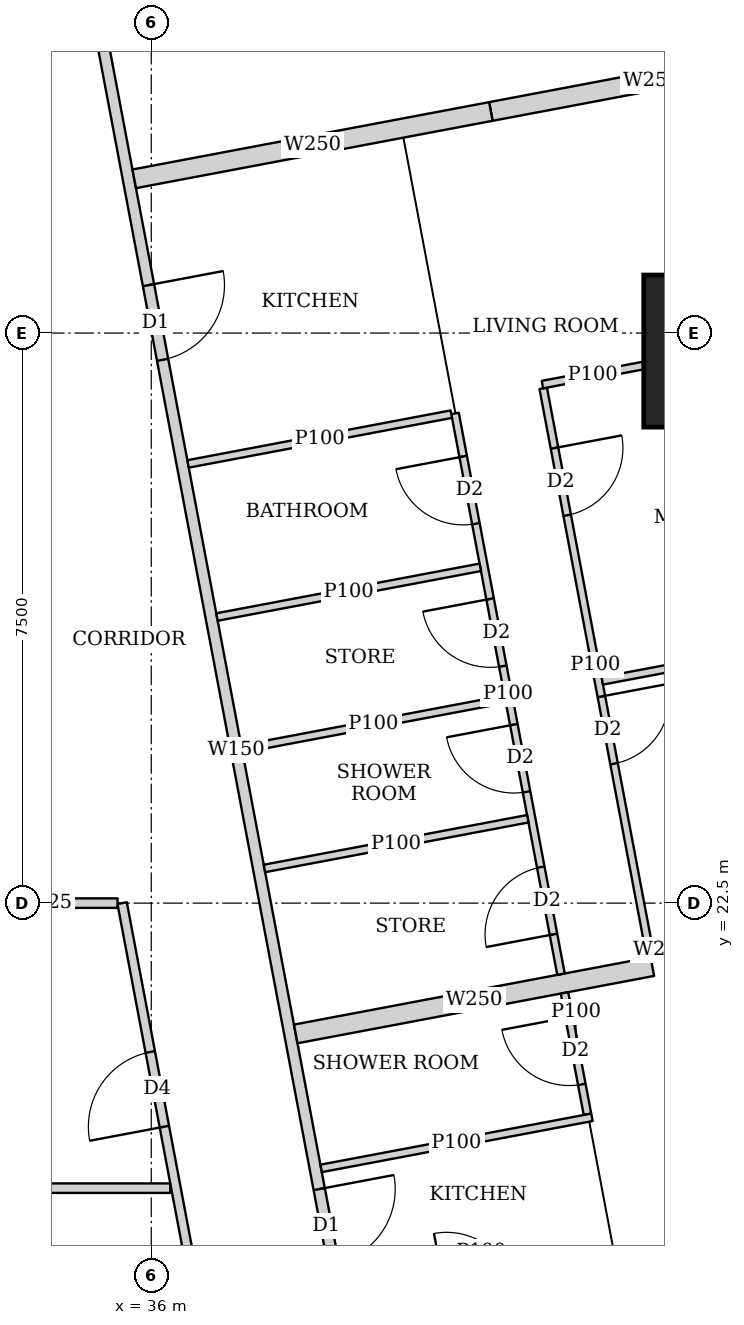
"""IFC4 building model, lengths in metres.
Left out: names, types, materials, properties, quantities, classifications, styles, units other than length and angle.
Written with IfcOpenShell. Run it as: python <this file> out.ifc"""

import sys

from ifc_helpers import new_model, si_unit, direction, frame, frame_2d, origin, origin_2d, place, context, subcontext, project, spatial, rectangle, extrude, element, fill, save


model = new_model("IFC4")
c1 = context("Model", 3, precision=1e-05, world=origin(), true_north=direction((0.0, 1.0)))
c2 = subcontext(c1, "Body", "Model", "MODEL_VIEW")
j1 = project(units=[si_unit("LENGTHUNIT", "METRE"), si_unit("PLANEANGLEUNIT", "RADIAN")], contexts=[c1])
p1 = place(None, origin())
s1 = spatial("IfcSite", under=j1, at=p1, CompositionType="ELEMENT")
p2 = place(p1, origin())
s2 = spatial("IfcBuilding", under=s1, at=p2, CompositionType="ELEMENT")
p3 = place(p2, frame((0.0, 0.0, 259.1)))
s3 = spatial("IfcBuildingStorey", under=s2, at=p3, CompositionType="ELEMENT", Elevation=259.1)
p4 = place(p3, frame((43.48, 29.763, 0.0), z_axis=(0.0, 0.0, 1.0), x_axis=(1.0, 0.0, 0.0)))
e1 = element("IfcColumn", 1, at=p4, inside=s3, PredefinedType="COLUMN", context=c2, shape_type="SweptSolid", body=[
    extrude(rectangle(XDim=2.0, YDim=2.0, at=origin_2d()), origin(), (0.0, 0.0, 1.0), 3.75),
])
p5 = place(p3, frame((33.781, 42.186, 0.0), z_axis=(0.0, 0.0, 1.0), x_axis=(0.185593518645, -0.9826266055, 0.0)))
e2 = element("IfcWall", 2, at=p5, inside=s3, PredefinedType="SOLIDWALL", context=c2, shape_type="SweptSolid", body=[
    extrude(rectangle(XDim=35.961, YDim=0.15, at=frame_2d((17.98, 0.0))), origin(), (0.0, 0.0, 1.0), 2.5),
])
p6 = place(p5, frame((7.183, 0.0, 0.0)))
e3 = element("IfcOpeningElement", 3, at=p6, cuts=e2, PredefinedType="OPENING", context=c2, shape_type="SweptSolid", body=[
    extrude(rectangle(XDim=1.0, YDim=2.1, at=frame_2d((0.5, 1.05))), frame((0.0, 0.085, 0.0), z_axis=(0.0, -1.0, 0.0), x_axis=(1.0, 0.0, 0.0)), (0.0, 0.0, 1.0), 0.17),
])
p7 = place(p5, frame((11.76, 0.0, 0.0)))
e4 = element("IfcOpeningElement", 4, at=p7, cuts=e2, PredefinedType="OPENING", context=c2, shape_type="SweptSolid", body=[
    extrude(rectangle(XDim=1.0, YDim=2.1, at=frame_2d((0.5, 1.05))), frame((0.0, 0.085, 0.0), z_axis=(0.0, -1.0, 0.0), x_axis=(1.0, 0.0, 0.0)), (0.0, 0.0, 1.0), 0.17),
])
p8 = place(p5, frame((23.863, 0.0, 0.0)))
e5 = element("IfcOpeningElement", 5, at=p8, cuts=e2, PredefinedType="OPENING", context=c2, shape_type="SweptSolid", body=[
    extrude(rectangle(XDim=1.0, YDim=2.1, at=frame_2d((0.5, 1.05))), frame((0.0, 0.085, 0.0), z_axis=(0.0, -1.0, 0.0), x_axis=(1.0, 0.0, 0.0)), (0.0, 0.0, 1.0), 0.17),
])
p9 = place(p5, frame((30.502, 0.0, 0.0)))
e6 = element("IfcOpeningElement", 6, at=p9, cuts=e2, PredefinedType="OPENING", context=c2, shape_type="SweptSolid", body=[
    extrude(rectangle(XDim=1.0, YDim=2.1, at=frame_2d((0.5, 1.05))), frame((0.0, 0.085, 0.0), z_axis=(0.0, -1.0, 0.0), x_axis=(1.0, 0.0, 0.0)), (0.0, 0.0, 1.0), 0.17),
])
p10 = place(p3, frame((41.157, 29.273, 0.0), z_axis=(0.0, 0.0, 1.0), x_axis=(0.18542464283, -0.982658486877, 0.0)))
e7 = element("IfcWall", 7, at=p10, inside=s3, PredefinedType="PARTITIONING", context=c2, shape_type="SweptSolid", body=[
    extrude(rectangle(XDim=7.421, YDim=0.1, at=frame_2d((3.71, 0.0))), origin(), (0.0, 0.0, 1.0), 2.5),
])
p11 = place(p10, frame((0.8, 0.0, 0.0)))
e8 = element("IfcOpeningElement", 8, at=p11, cuts=e7, PredefinedType="OPENING", context=c2, shape_type="SweptSolid", body=[
    extrude(rectangle(XDim=0.9, YDim=2.1, at=frame_2d((0.45, 1.05))), frame((0.0, 0.06, 0.0), z_axis=(0.0, -1.0, 0.0), x_axis=(1.0, 0.0, 0.0)), (0.0, 0.0, 1.0), 0.12),
])
p12 = place(p10, frame((4.126, 0.0, 0.0)))
e9 = element("IfcOpeningElement", 9, at=p12, cuts=e7, PredefinedType="OPENING", context=c2, shape_type="SweptSolid", body=[
    extrude(rectangle(XDim=0.9, YDim=2.1, at=frame_2d((0.45, 1.05))), frame((0.0, 0.06, 0.0), z_axis=(0.0, -1.0, 0.0), x_axis=(1.0, 0.0, 0.0)), (0.0, 0.0, 1.0), 0.12),
])
p13 = place(p3, frame((39.997, 28.942, 0.0), z_axis=(0.0, 0.0, 1.0), x_axis=(0.185686318797, -0.982609073341, 0.0)))
e10 = element("IfcWall", 10, at=p13, inside=s3, PredefinedType="PARTITIONING", context=c2, shape_type="SweptSolid", body=[
    extrude(rectangle(XDim=7.508, YDim=0.1, at=frame_2d((3.754, 0.0))), origin(), (0.0, 0.0, 1.0), 2.5),
])
p14 = place(p13, frame((0.576, 0.0, 0.0)))
e11 = element("IfcOpeningElement", 11, at=p14, cuts=e10, PredefinedType="OPENING", context=c2, shape_type="SweptSolid", body=[
    extrude(rectangle(XDim=0.9, YDim=2.1, at=frame_2d((0.45, 1.05))), frame((0.0, 0.06, 0.0), z_axis=(0.0, -1.0, 0.0), x_axis=(1.0, 0.0, 0.0)), (0.0, 0.0, 1.0), 0.12),
])
p15 = place(p13, frame((4.166, 0.0, 0.0)))
e12 = element("IfcOpeningElement", 12, at=p15, cuts=e10, PredefinedType="OPENING", context=c2, shape_type="SweptSolid", body=[
    extrude(rectangle(XDim=0.9, YDim=2.1, at=frame_2d((0.45, 1.05))), frame((0.0, 0.06, 0.0), z_axis=(0.0, -1.0, 0.0), x_axis=(1.0, 0.0, 0.0)), (0.0, 0.0, 1.0), 0.12),
])
p16 = place(p13, frame((2.483, 0.0, 0.0)))
e13 = element("IfcOpeningElement", 13, at=p16, cuts=e10, PredefinedType="OPENING", context=c2, shape_type="SweptSolid", body=[
    extrude(rectangle(XDim=0.9, YDim=2.1, at=frame_2d((0.45, 1.05))), frame((0.0, 0.06, 0.0), z_axis=(0.0, -1.0, 0.0), x_axis=(1.0, 0.0, 0.0)), (0.0, 0.0, 1.0), 0.12),
])
p17 = place(p13, frame((6.074, 0.0, 0.0)))
e14 = element("IfcOpeningElement", 14, at=p17, cuts=e10, PredefinedType="OPENING", context=c2, shape_type="SweptSolid", body=[
    extrude(rectangle(XDim=0.9, YDim=2.1, at=frame_2d((0.45, 1.05))), frame((0.0, 0.06, 0.0), z_axis=(0.0, -1.0, 0.0), x_axis=(1.0, 0.0, 0.0)), (0.0, 0.0, 1.0), 0.12),
])
p18 = place(p3, frame((42.47, 29.572, 0.0), z_axis=(0.0, 0.0, 1.0), x_axis=(-0.982610503289, -0.185678751683, 0.0)))
e15 = element("IfcWall", 15, at=p18, inside=s3, PredefinedType="PARTITIONING", context=c2, shape_type="SweptSolid", body=[
    extrude(rectangle(XDim=1.346, YDim=0.1, at=frame_2d((0.673, 0.0))), origin(), (0.0, 0.0, 1.0), 2.5),
])
p19 = place(p3, frame((46.11, 26.213, 0.0), z_axis=(0.0, 0.0, 1.0), x_axis=(-0.982623519589, -0.185609856287, 0.0)))
e16 = element("IfcWall", 16, at=p19, inside=s3, PredefinedType="PARTITIONING", context=c2, shape_type="SweptSolid", body=[
    extrude(rectangle(XDim=4.25, YDim=0.1, at=frame_2d((2.125, 0.0))), origin(), (0.0, 0.0, 1.0), 2.5),
])
p20 = place(p3, frame((39.948, 28.933, 0.0), z_axis=(0.0, 0.0, 1.0), x_axis=(-0.982588017646, -0.185797706064, 0.0)))
e17 = element("IfcWall", 17, at=p20, inside=s3, PredefinedType="PARTITIONING", context=c2, shape_type="SweptSolid", body=[
    extrude(rectangle(XDim=3.525, YDim=0.1, at=frame_2d((1.763, 0.0))), origin(), (0.0, 0.0, 1.0), 3.5),
])
p21 = place(p3, frame((40.656, 25.183, 0.0), z_axis=(0.0, 0.0, 1.0), x_axis=(-0.982576058723, -0.185860939478, 0.0)))
e18 = element("IfcWall", 18, at=p21, inside=s3, PredefinedType="PARTITIONING", context=c2, shape_type="SweptSolid", body=[
    extrude(rectangle(XDim=3.524, YDim=0.1, at=frame_2d((1.762, 0.0))), origin(), (0.0, 0.0, 1.0), 3.5),
])
p22 = place(p3, frame((40.329, 26.918, 0.0), z_axis=(0.0, 0.0, 1.0), x_axis=(-0.982638553676, -0.185530247748, 0.0)))
e19 = element("IfcWall", 19, at=p22, inside=s3, PredefinedType="PARTITIONING", context=c2, shape_type="SweptSolid", body=[
    extrude(rectangle(XDim=3.525, YDim=0.1, at=frame_2d((1.763, 0.0))), origin(), (0.0, 0.0, 1.0), 3.5),
])
p23 = place(p3, frame((40.954, 23.61, 0.0), z_axis=(0.0, 0.0, 1.0), x_axis=(-0.98264808502, -0.18547975902, 0.0)))
e20 = element("IfcWall", 20, at=p23, inside=s3, PredefinedType="PARTITIONING", context=c2, shape_type="SweptSolid", body=[
    extrude(rectangle(XDim=3.526, YDim=0.1, at=frame_2d((1.763, 0.0))), origin(), (0.0, 0.0, 1.0), 2.5),
])
p24 = place(p3, frame((44.693, 33.713, 0.0), z_axis=(0.0, 0.0, 1.0), x_axis=(-0.982633535512, -0.185556823879, 0.0)))
e21 = element("IfcWall", 21, at=p24, inside=s3, PredefinedType="SOLIDWALL", context=c2, shape_type="SweptSolid", body=[
    extrude(rectangle(XDim=4.3, YDim=0.25, at=frame_2d((2.15, 0.0))), origin(), (0.0, 0.0, 1.0), 2.5),
])
p25 = place(p3, frame((40.468, 32.915, 0.0), z_axis=(0.0, 0.0, 1.0), x_axis=(-0.982635807605, -0.185544791394, 0.0)))
e22 = element("IfcWall", 22, at=p25, inside=s3, PredefinedType="SOLIDWALL", context=c2, shape_type="SweptSolid", body=[
    extrude(rectangle(XDim=4.775, YDim=0.25, at=frame_2d((2.388, 0.0))), origin(), (0.0, 0.0, 1.0), 3.5),
])
p26 = place(p3, frame((41.437, 21.319, 0.0), z_axis=(0.0, 0.0, 1.0), x_axis=(0.185793689589, -0.982588777113, 0.0)))
e23 = element("IfcWall", 23, at=p26, inside=s3, PredefinedType="PARTITIONING", context=c2, shape_type="SweptSolid", body=[
    extrude(rectangle(XDim=1.625, YDim=0.1, at=frame_2d((0.813, 0.0))), origin(), (0.0, 0.0, 1.0), 3.5),
])
p27 = place(p26, frame((0.325, 0.0, 0.0)))
e24 = element("IfcOpeningElement", 24, at=p27, cuts=e23, PredefinedType="OPENING", context=c2, shape_type="SweptSolid", body=[
    extrude(rectangle(XDim=0.9, YDim=2.1, at=frame_2d((0.45, 1.05))), frame((0.0, 0.06, 0.0), z_axis=(0.0, -1.0, 0.0), x_axis=(1.0, 0.0, 0.0)), (0.0, 0.0, 1.0), 0.12),
])
p28 = place(p3, frame((41.798, 19.682, 0.0), z_axis=(0.0, 0.0, 1.0), x_axis=(-0.982681091817, -0.185304807776, 0.0)))
e25 = element("IfcWall", 25, at=p28, inside=s3, PredefinedType="PARTITIONING", context=c2, shape_type="SweptSolid", body=[
    extrude(rectangle(XDim=3.626, YDim=0.1, at=frame_2d((1.813, 0.0))), origin(), (0.0, 0.0, 1.0), 3.5),
])
p29 = place(p3, frame((42.873, 21.918, 0.0), z_axis=(0.0, 0.0, 1.0), x_axis=(-0.982431406936, -0.186624035603, 0.0)))
e26 = element("IfcWall", 26, at=p29, inside=s3, PredefinedType="SOLIDWALL", context=c2, shape_type="SweptSolid", body=[
    extrude(rectangle(XDim=0.322, YDim=0.25, at=frame_2d((0.161, 0.0))), origin(), (0.0, 0.0, 1.0), 2.5),
])
p30 = place(p3, frame((42.593, 21.665, 0.0), z_axis=(0.0, 0.0, 1.0), x_axis=(-0.982635807605, -0.185544791394, 0.0)))
e27 = element("IfcWall", 27, at=p30, inside=s3, PredefinedType="SOLIDWALL", context=c2, shape_type="SweptSolid", body=[
    extrude(rectangle(XDim=4.775, YDim=0.25, at=frame_2d((2.388, 0.0))), origin(), (0.0, 0.0, 1.0), 2.5),
])
p31 = place(p3, frame((37.947, 10.163, 0.0), z_axis=(0.0, 0.0, 1.0), x_axis=(-0.185589250699, 0.982627411599, 0.0)))
e28 = element("IfcWall", 28, at=p31, inside=s3, PredefinedType="PARTITIONING", context=c2, shape_type="SweptSolid", body=[
    extrude(rectangle(XDim=12.555, YDim=0.125, at=frame_2d((6.277, 0.0))), origin(), (0.0, 0.0, 1.0), 2.5),
])
p32 = place(p31, frame((0.708, 0.0, 0.0)))
e29 = element("IfcOpeningElement", 29, at=p32, cuts=e28, PredefinedType="OPENING", context=c2, shape_type="SweptSolid", body=[
    extrude(rectangle(XDim=1.0, YDim=2.1, at=frame_2d((0.5, 1.05))), frame((0.0, 0.073, 0.0), z_axis=(0.0, -1.0, 0.0), x_axis=(1.0, 0.0, 0.0)), (0.0, 0.0, 1.0), 0.145),
])
p33 = place(p31, frame((5.9, 0.0, 0.0)))
e30 = element("IfcOpeningElement", 30, at=p33, cuts=e28, PredefinedType="OPENING", context=c2, shape_type="SweptSolid", body=[
    extrude(rectangle(XDim=1.0, YDim=2.1, at=frame_2d((0.5, 1.05))), frame((0.0, 0.073, 0.0), z_axis=(0.0, -1.0, 0.0), x_axis=(1.0, 0.0, 0.0)), (0.0, 0.0, 1.0), 0.145),
])
p34 = place(p31, frame((9.562, 0.0, 0.0)))
e31 = element("IfcOpeningElement", 31, at=p34, cuts=e28, PredefinedType="OPENING", context=c2, shape_type="SweptSolid", body=[
    extrude(rectangle(XDim=1.0, YDim=2.1, at=frame_2d((0.5, 1.05))), frame((0.0, 0.073, 0.0), z_axis=(0.0, -1.0, 0.0), x_axis=(1.0, 0.0, 0.0)), (0.0, 0.0, 1.0), 0.145),
])
p35 = place(p3, frame((29.25, 18.75, 0.0), z_axis=(0.0, 0.0, 1.0), x_axis=(1.0, 0.0, 0.0)))
e32 = element("IfcWall", 32, at=p35, inside=s3, PredefinedType="PARTITIONING", context=c2, shape_type="SweptSolid", body=[
    extrude(rectangle(XDim=7.0, YDim=0.125, at=frame_2d((3.5, 0.0))), origin(), (0.0, 0.0, 1.0), 3.5),
])
p36 = place(p3, frame((33.701, 22.5, 0.0), z_axis=(0.0, 0.0, 1.0), x_axis=(1.0, 0.0, 0.0)))
e33 = element("IfcWall", 33, at=p36, inside=s3, PredefinedType="PARTITIONING", context=c2, shape_type="SweptSolid", body=[
    extrude(rectangle(XDim=1.855, YDim=0.125, at=frame_2d((0.927, 0.0))), origin(), (0.0, 0.0, 1.0), 2.5),
])
p37 = place(p11, origin())
e34 = element("IfcDoor", 34, at=p37, inside=s3, OperationType="SINGLE_SWING_LEFT", PredefinedType="DOOR", context=c2, shape_type="SweptSolid", body=[
    extrude(rectangle(XDim=0.9, YDim=2.1, at=frame_2d((0.45, 1.05))), frame((0.0, 0.025, 0.0), z_axis=(0.0, -1.0, 0.0), x_axis=(1.0, 0.0, 0.0)), (0.0, 0.0, 1.0), 0.05),
])
fill(e8, e34)
p38 = place(p12, origin())
e35 = element("IfcDoor", 35, at=p38, inside=s3, OperationType="SINGLE_SWING_LEFT", PredefinedType="DOOR", context=c2, shape_type="SweptSolid", body=[
    extrude(rectangle(XDim=0.9, YDim=2.1, at=frame_2d((0.45, 1.05))), frame((0.0, 0.025, 0.0), z_axis=(0.0, -1.0, 0.0), x_axis=(1.0, 0.0, 0.0)), (0.0, 0.0, 1.0), 0.05),
])
fill(e9, e35)
p39 = place(p14, origin())
e36 = element("IfcDoor", 36, at=p39, inside=s3, OperationType="SINGLE_SWING_RIGHT", PredefinedType="DOOR", context=c2, shape_type="SweptSolid", body=[
    extrude(rectangle(XDim=0.9, YDim=2.1, at=frame_2d((0.45, 1.05))), frame((0.0, 0.025, 0.0), z_axis=(0.0, -1.0, 0.0), x_axis=(1.0, 0.0, 0.0)), (0.0, 0.0, 1.0), 0.05),
])
fill(e11, e36)
p40 = place(p15, origin())
e37 = element("IfcDoor", 37, at=p40, inside=s3, OperationType="SINGLE_SWING_RIGHT", PredefinedType="DOOR", context=c2, shape_type="SweptSolid", body=[
    extrude(rectangle(XDim=0.9, YDim=2.1, at=frame_2d((0.45, 1.05))), frame((0.0, 0.025, 0.0), z_axis=(0.0, -1.0, 0.0), x_axis=(1.0, 0.0, 0.0)), (0.0, 0.0, 1.0), 0.05),
])
fill(e12, e37)
p41 = place(p16, origin())
e38 = element("IfcDoor", 38, at=p41, inside=s3, OperationType="SINGLE_SWING_RIGHT", PredefinedType="DOOR", context=c2, shape_type="SweptSolid", body=[
    extrude(rectangle(XDim=0.9, YDim=2.1, at=frame_2d((0.45, 1.05))), frame((0.0, 0.025, 0.0), z_axis=(0.0, -1.0, 0.0), x_axis=(1.0, 0.0, 0.0)), (0.0, 0.0, 1.0), 0.05),
])
fill(e13, e38)
p42 = place(p17, origin())
e39 = element("IfcDoor", 39, at=p42, inside=s3, OperationType="SINGLE_SWING_LEFT", PredefinedType="DOOR", context=c2, shape_type="SweptSolid", body=[
    extrude(rectangle(XDim=0.9, YDim=2.1, at=frame_2d((0.45, 1.05))), frame((0.0, 0.025, 0.0), z_axis=(0.0, -1.0, 0.0), x_axis=(1.0, 0.0, 0.0)), (0.0, 0.0, 1.0), 0.05),
])
fill(e14, e39)
p43 = place(p7, origin())
e40 = element("IfcDoor", 40, at=p43, inside=s3, OperationType="SINGLE_SWING_LEFT", PredefinedType="DOOR", context=c2, shape_type="SweptSolid", body=[
    extrude(rectangle(XDim=1.0, YDim=2.1, at=frame_2d((0.5, 1.05))), frame((0.0, 0.025, 0.0), z_axis=(0.0, -1.0, 0.0), x_axis=(1.0, 0.0, 0.0)), (0.0, 0.0, 1.0), 0.05),
])
fill(e4, e40)
p44 = place(p27, origin())
e41 = element("IfcDoor", 41, at=p44, inside=s3, OperationType="SINGLE_SWING_RIGHT", PredefinedType="DOOR", context=c2, shape_type="SweptSolid", body=[
    extrude(rectangle(XDim=0.9, YDim=2.1, at=frame_2d((0.45, 1.05))), frame((0.0, 0.025, 0.0), z_axis=(0.0, -1.0, 0.0), x_axis=(1.0, 0.0, 0.0)), (0.0, 0.0, 1.0), 0.05),
])
fill(e24, e41)
p45 = place(p8, origin())
e42 = element("IfcDoor", 42, at=p45, inside=s3, OperationType="SINGLE_SWING_LEFT", PredefinedType="DOOR", context=c2, shape_type="SweptSolid", body=[
    extrude(rectangle(XDim=1.0, YDim=2.1, at=frame_2d((0.5, 1.05))), frame((0.0, 0.025, 0.0), z_axis=(0.0, -1.0, 0.0), x_axis=(1.0, 0.0, 0.0)), (0.0, 0.0, 1.0), 0.05),
])
fill(e5, e42)
p46 = place(p34, origin())
e43 = element("IfcDoor", 43, at=p46, inside=s3, OperationType="SINGLE_SWING_LEFT", PredefinedType="DOOR", context=c2, shape_type="SweptSolid", body=[
    extrude(rectangle(XDim=1.0, YDim=2.1, at=frame_2d((0.5, 1.05))), frame((0.0, 0.025, 0.0), z_axis=(0.0, -1.0, 0.0), x_axis=(1.0, 0.0, 0.0)), (0.0, 0.0, 1.0), 0.05),
])
fill(e31, e43)
save(model, sys.argv[1])
